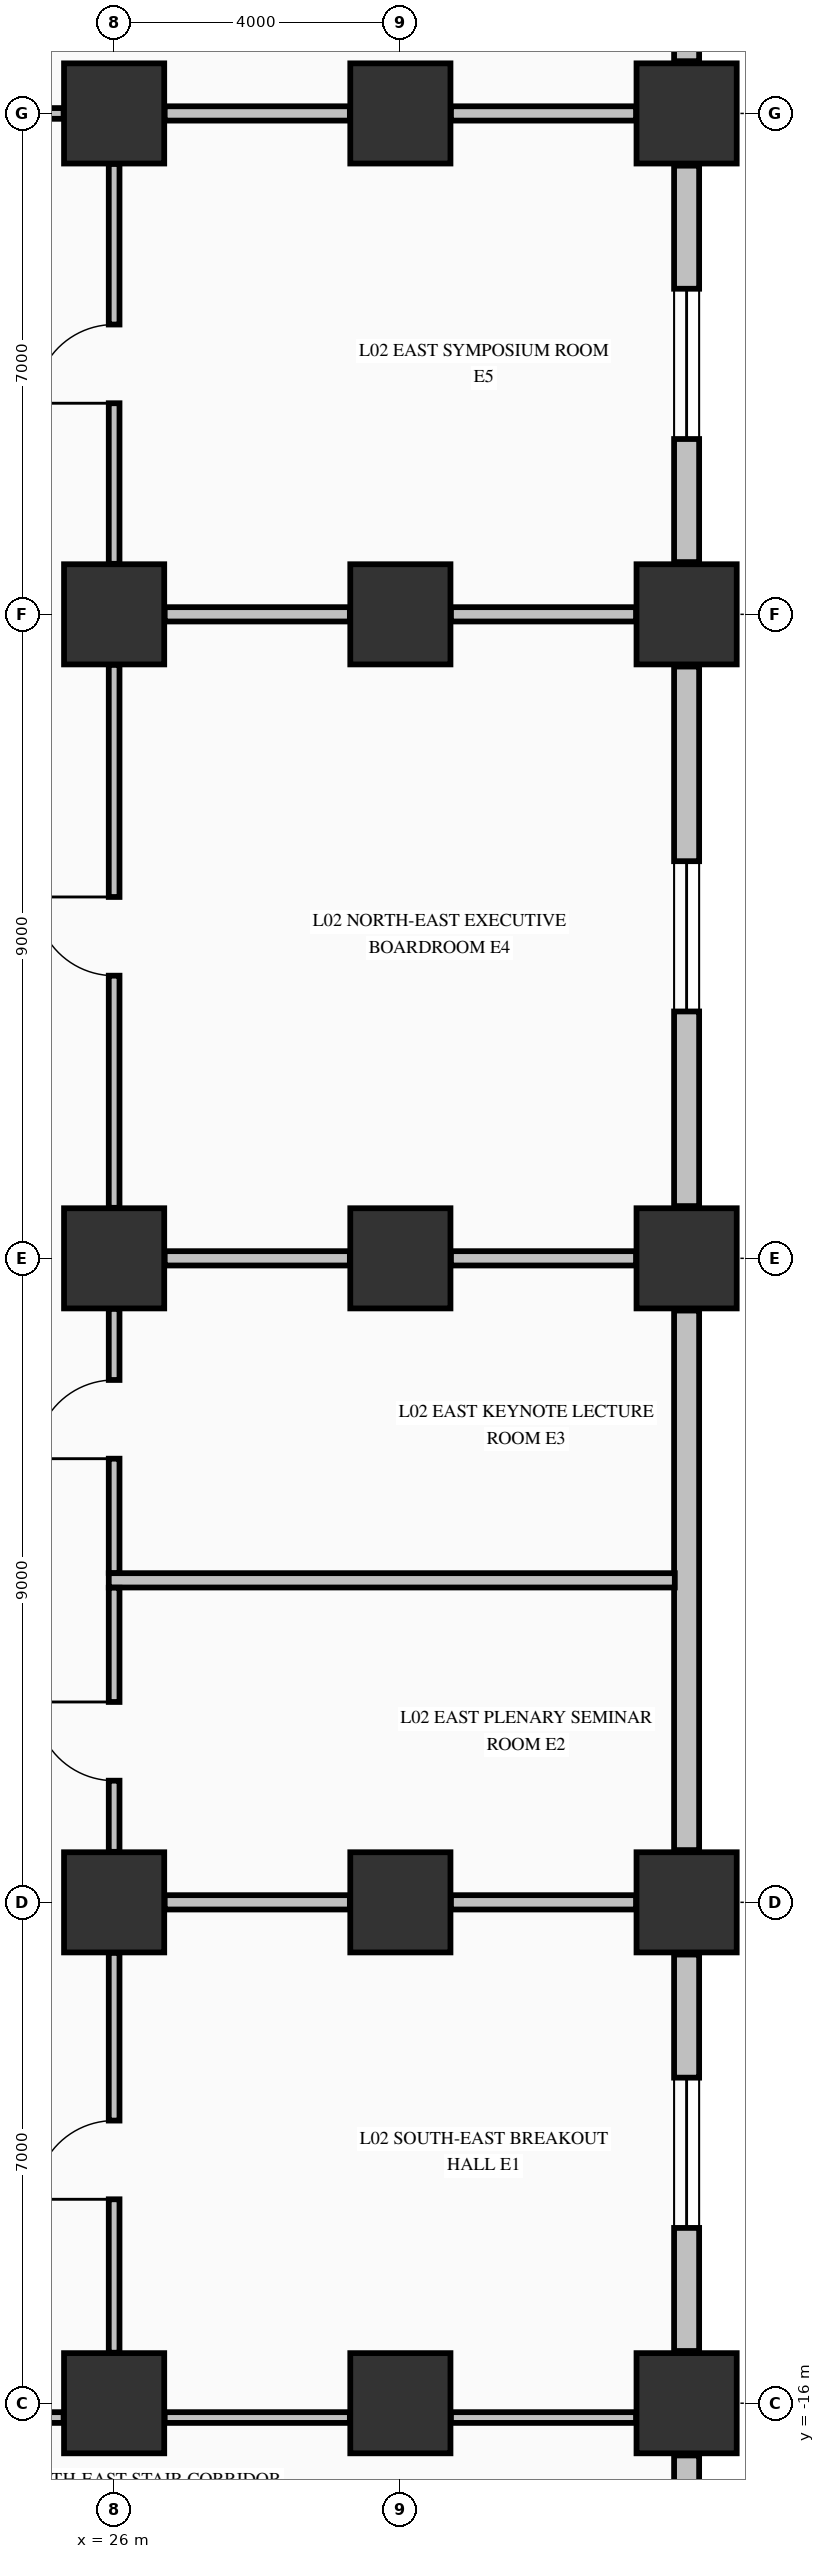
"""IFC4 building model, lengths in metres.
Left out: names, types, materials, properties, quantities, classifications, styles, units other than length and angle.
Written with IfcOpenShell. Run it as: python <this file> out.ifc"""

import sys

from ifc_helpers import new_model, si_unit, direction, frame, frame_2d, origin, origin_2d, place, context, subcontext, project, spatial, rectangle, extrude, element, fill, save


model = new_model("IFC4")
c1 = context("Model", 3, precision=1e-05, world=origin(), true_north=direction((0.0, 1.0)))
c2 = subcontext(c1, "Body", "Model", "MODEL_VIEW")
j1 = project(units=[si_unit("LENGTHUNIT", "METRE"), si_unit("PLANEANGLEUNIT", "RADIAN")], contexts=[c1])
p1 = place(None, origin())
s1 = spatial("IfcSite", under=j1, at=p1, CompositionType="ELEMENT")
p2 = place(p1, origin())
s2 = spatial("IfcBuilding", under=s1, at=p2, CompositionType="ELEMENT")
p3 = place(p2, frame((0.0, 0.0, 10.88)))
s3 = spatial("IfcBuildingStorey", under=s2, at=p3, CompositionType="ELEMENT", Elevation=10.88)
for number, where, z_axis, x_axis in (
    (1, (26.0, -16.0, 0.0), (0.0, 0.0, 1.0), (1.0, 0.0, 0.0)),
    (2, (26.0, -9.0, 0.0), (0.0, 0.0, 1.0), (1.0, 0.0, 0.0)),
    (3, (26.0, 0.0, 0.0), (0.0, 0.0, 1.0), (1.0, 0.0, 0.0)),
    (4, (26.0, 9.0, 0.0), (0.0, 0.0, 1.0), (1.0, 0.0, 0.0)),
    (5, (26.0, 16.0, 0.0), (0.0, 0.0, 1.0), (1.0, 0.0, 0.0)),
    (6, (30.0, -16.0, 0.0), (0.0, 0.0, 1.0), (1.0, 0.0, 0.0)),
    (7, (30.0, -9.0, 0.0), (0.0, 0.0, 1.0), (1.0, 0.0, 0.0)),
    (8, (30.0, 0.0, 0.0), (0.0, 0.0, 1.0), (1.0, 0.0, 0.0)),
    (9, (30.0, 9.0, 0.0), (0.0, 0.0, 1.0), (1.0, 0.0, 0.0)),
    (10, (30.0, 16.0, 0.0), (0.0, 0.0, 1.0), (1.0, 0.0, 0.0)),
    (11, (34.0, -16.0, 0.0), (0.0, 0.0, 1.0), (1.0, 0.0, 0.0)),
    (12, (34.0, -9.0, 0.0), (0.0, 0.0, 1.0), (1.0, 0.0, 0.0)),
    (13, (34.0, 0.0, 0.0), (0.0, 0.0, 1.0), (1.0, 0.0, 0.0)),
    (14, (34.0, 9.0, 0.0), (0.0, 0.0, 1.0), (1.0, 0.0, 0.0)),
    (15, (34.0, 16.0, 0.0), (0.0, 0.0, 1.0), (1.0, 0.0, 0.0)),
):
    element("IfcColumn", number, at=place(p3, frame(where, z_axis=z_axis, x_axis=x_axis)), inside=s3, PredefinedType="COLUMN", context=c2, shape_type="SweptSolid", body=[
        extrude(rectangle(XDim=1.4, YDim=1.4, at=origin_2d()), origin(), (0.0, 0.0, 1.0), 5.09),
    ])
p4 = place(p3, frame((34.0, -16.73, 0.0), z_axis=(0.0, 0.0, 1.0), x_axis=(0.0, -1.0, 0.0)))
e16 = element("IfcWall", 16, at=p4, inside=s3, PredefinedType="STANDARD", context=c2, shape_type="SweptSolid", body=[
    extrude(rectangle(XDim=4.54, YDim=0.35, at=frame_2d((2.27, 0.0))), origin(), (0.0, 0.0, 1.0), 5.09),
])
p5 = place(p3, frame((34.0, -9.73, 0.0), z_axis=(0.0, 0.0, 1.0), x_axis=(0.0, -1.0, 0.0)))
e17 = element("IfcWall", 17, at=p5, inside=s3, PredefinedType="STANDARD", context=c2, shape_type="SweptSolid", body=[
    extrude(rectangle(XDim=5.54, YDim=0.35, at=frame_2d((2.77, 0.0))), origin(), (0.0, 0.0, 1.0), 4.482),
])
p6 = place(p5, frame((1.72, 0.0, 0.75)))
e18 = element("IfcOpeningElement", 18, at=p6, cuts=e17, PredefinedType="OPENING", context=c2, shape_type="SweptSolid", body=[
    extrude(rectangle(XDim=2.1, YDim=1.75, at=frame_2d((1.05, 0.875))), frame((0.0, 0.185, 0.0), z_axis=(0.0, -1.0, 0.0), x_axis=(1.0, 0.0, 0.0)), (0.0, 0.0, 1.0), 0.37),
])
p7 = place(p3, frame((34.0, -0.73, 0.0), z_axis=(0.0, 0.0, 1.0), x_axis=(0.0, -1.0, 0.0)))
e19 = element("IfcWall", 19, at=p7, inside=s3, PredefinedType="STANDARD", context=c2, shape_type="SweptSolid", body=[
    extrude(rectangle(XDim=7.54, YDim=0.35, at=frame_2d((3.77, 0.0))), origin(), (0.0, 0.0, 1.0), 4.482),
])
p8 = place(p3, frame((34.0, 8.27, 0.0), z_axis=(0.0, 0.0, 1.0), x_axis=(0.0, -1.0, 0.0)))
e20 = element("IfcWall", 20, at=p8, inside=s3, PredefinedType="STANDARD", context=c2, shape_type="SweptSolid", body=[
    extrude(rectangle(XDim=7.54, YDim=0.35, at=frame_2d((3.77, 0.0))), origin(), (0.0, 0.0, 1.0), 4.482),
])
p9 = place(p8, frame((2.72, 0.0, 0.75)))
e21 = element("IfcOpeningElement", 21, at=p9, cuts=e20, PredefinedType="OPENING", context=c2, shape_type="SweptSolid", body=[
    extrude(rectangle(XDim=2.1, YDim=1.75, at=frame_2d((1.05, 0.875))), frame((0.0, 0.185, 0.0), z_axis=(0.0, -1.0, 0.0), x_axis=(1.0, 0.0, 0.0)), (0.0, 0.0, 1.0), 0.37),
])
p10 = place(p3, frame((34.0, 15.27, 0.0), z_axis=(0.0, 0.0, 1.0), x_axis=(0.0, -1.0, 0.0)))
e22 = element("IfcWall", 22, at=p10, inside=s3, PredefinedType="STANDARD", context=c2, shape_type="SweptSolid", body=[
    extrude(rectangle(XDim=5.54, YDim=0.35, at=frame_2d((2.77, 0.0))), origin(), (0.0, 0.0, 1.0), 4.482),
])
p11 = place(p10, frame((1.72, 0.0, 0.75)))
e23 = element("IfcOpeningElement", 23, at=p11, cuts=e22, PredefinedType="OPENING", context=c2, shape_type="SweptSolid", body=[
    extrude(rectangle(XDim=2.1, YDim=1.75, at=frame_2d((1.05, 0.875))), frame((0.0, 0.185, 0.0), z_axis=(0.0, -1.0, 0.0), x_axis=(1.0, 0.0, 0.0)), (0.0, 0.0, 1.0), 0.37),
])
p12 = place(p3, frame((34.0, 21.27, 0.0), z_axis=(0.0, 0.0, 1.0), x_axis=(0.0, -1.0, 0.0)))
e24 = element("IfcWall", 24, at=p12, inside=s3, PredefinedType="STANDARD", context=c2, shape_type="SweptSolid", body=[
    extrude(rectangle(XDim=4.54, YDim=0.35, at=frame_2d((2.27, 0.0))), origin(), (0.0, 0.0, 1.0), 5.09),
])
p13 = place(p3, frame((20.806, -16.2, 0.0), z_axis=(0.0, 0.0, 1.0), x_axis=(1.0, 0.0, 0.0)))
e25 = element("IfcWall", 25, at=p13, inside=s3, PredefinedType="PARTITIONING", context=c2, shape_type="SweptSolid", body=[
    extrude(rectangle(XDim=4.488, YDim=0.15, at=frame_2d((2.244, 0.0))), origin(), (0.0, 0.0, 1.0), 4.132),
])
p14 = place(p13, frame((0.15, 0.0, 0.0)))
e26 = element("IfcOpeningElement", 26, at=p14, cuts=e25, PredefinedType="OPENING", context=c2, shape_type="SweptSolid", body=[
    extrude(rectangle(XDim=1.1, YDim=2.15, at=frame_2d((0.55, 1.075))), frame((0.0, 0.085, 0.0), z_axis=(0.0, -1.0, 0.0), x_axis=(1.0, 0.0, 0.0)), (0.0, 0.0, 1.0), 0.17),
])
p15 = place(p13, frame((2.844, 0.0, 0.0)))
e27 = element("IfcOpeningElement", 27, at=p15, cuts=e25, PredefinedType="OPENING", context=c2, shape_type="SweptSolid", body=[
    extrude(rectangle(XDim=1.1, YDim=2.15, at=frame_2d((0.55, 1.075))), frame((0.0, 0.085, 0.0), z_axis=(0.0, -1.0, 0.0), x_axis=(1.0, 0.0, 0.0)), (0.0, 0.0, 1.0), 0.17),
])
for number, where, z_axis, x_axis in (
    (28, (26.706, -16.2, 0.0), (0.0, 0.0, 1.0), (1.0, 0.0, 0.0)),
    (29, (30.706, -16.2, 0.0), (0.0, 0.0, 1.0), (1.0, 0.0, 0.0)),
):
    element("IfcWall", number, at=place(p3, frame(where, z_axis=z_axis, x_axis=x_axis)), inside=s3, PredefinedType="PARTITIONING", context=c2, shape_type="SweptSolid", body=[
        extrude(rectangle(XDim=2.588, YDim=0.15, at=frame_2d((1.294, 0.0))), origin(), (0.0, 0.0, 1.0), 4.132),
    ])
for number, where, z_axis, x_axis in (
    (30, (26.706, -9.0, 0.0), (0.0, 0.0, 1.0), (1.0, 0.0, 0.0)),
    (31, (30.706, -9.0, 0.0), (0.0, 0.0, 1.0), (1.0, 0.0, 0.0)),
):
    element("IfcWall", number, at=place(p3, frame(where, z_axis=z_axis, x_axis=x_axis)), inside=s3, PredefinedType="PARTITIONING", context=c2, shape_type="SweptSolid", body=[
        extrude(rectangle(XDim=2.588, YDim=0.2, at=frame_2d((1.294, 0.0))), origin(), (0.0, 0.0, 1.0), 4.132),
    ])
p16 = place(p3, frame((25.925, -4.5, 0.0), z_axis=(0.0, 0.0, 1.0), x_axis=(1.0, 0.0, 0.0)))
e32 = element("IfcWall", 32, at=p16, inside=s3, PredefinedType="PARTITIONING", context=c2, shape_type="SweptSolid", body=[
    extrude(rectangle(XDim=7.91, YDim=0.2, at=frame_2d((3.955, 0.0))), origin(), (0.0, 0.0, 1.0), 4.48),
])
for number, where, z_axis, x_axis in (
    (33, (26.706, 0.0, 0.0), (0.0, 0.0, 1.0), (1.0, 0.0, 0.0)),
    (34, (30.706, 0.0, 0.0), (0.0, 0.0, 1.0), (1.0, 0.0, 0.0)),
    (35, (26.706, 9.0, 0.0), (0.0, 0.0, 1.0), (1.0, 0.0, 0.0)),
    (36, (30.706, 9.0, 0.0), (0.0, 0.0, 1.0), (1.0, 0.0, 0.0)),
):
    element("IfcWall", number, at=place(p3, frame(where, z_axis=z_axis, x_axis=x_axis)), inside=s3, PredefinedType="PARTITIONING", context=c2, shape_type="SweptSolid", body=[
        extrude(rectangle(XDim=2.588, YDim=0.2, at=frame_2d((1.294, 0.0))), origin(), (0.0, 0.0, 1.0), 4.132),
    ])
p17 = place(p3, frame((20.806, 16.0, 0.0), z_axis=(0.0, 0.0, 1.0), x_axis=(1.0, 0.0, 0.0)))
e37 = element("IfcWall", 37, at=p17, inside=s3, PredefinedType="PARTITIONING", context=c2, shape_type="SweptSolid", body=[
    extrude(rectangle(XDim=4.488, YDim=0.15, at=frame_2d((2.244, 0.0))), origin(), (0.0, 0.0, 1.0), 4.132),
])
p18 = place(p17, frame((0.15, 0.0, 0.0)))
e38 = element("IfcOpeningElement", 38, at=p18, cuts=e37, PredefinedType="OPENING", context=c2, shape_type="SweptSolid", body=[
    extrude(rectangle(XDim=1.1, YDim=2.15, at=frame_2d((0.55, 1.075))), frame((0.0, 0.085, 0.0), z_axis=(0.0, -1.0, 0.0), x_axis=(1.0, 0.0, 0.0)), (0.0, 0.0, 1.0), 0.17),
])
p19 = place(p17, frame((2.844, 0.0, 0.0)))
e39 = element("IfcOpeningElement", 39, at=p19, cuts=e37, PredefinedType="OPENING", context=c2, shape_type="SweptSolid", body=[
    extrude(rectangle(XDim=1.1, YDim=2.15, at=frame_2d((0.55, 1.075))), frame((0.0, 0.085, 0.0), z_axis=(0.0, -1.0, 0.0), x_axis=(1.0, 0.0, 0.0)), (0.0, 0.0, 1.0), 0.17),
])
for number, where, z_axis, x_axis in (
    (40, (26.706, 16.0, 0.0), (0.0, 0.0, 1.0), (1.0, 0.0, 0.0)),
    (41, (30.706, 16.0, 0.0), (0.0, 0.0, 1.0), (1.0, 0.0, 0.0)),
):
    element("IfcWall", number, at=place(p3, frame(where, z_axis=z_axis, x_axis=x_axis)), inside=s3, PredefinedType="PARTITIONING", context=c2, shape_type="SweptSolid", body=[
        extrude(rectangle(XDim=2.588, YDim=0.2, at=frame_2d((1.294, 0.0))), origin(), (0.0, 0.0, 1.0), 4.132),
    ])
p20 = place(p3, frame((26.0, -15.294, 0.0), z_axis=(0.0, 0.0, 1.0), x_axis=(0.0, 1.0, 0.0)))
e42 = element("IfcWall", 42, at=p20, inside=s3, PredefinedType="PARTITIONING", context=c2, shape_type="SweptSolid", body=[
    extrude(rectangle(XDim=5.588, YDim=0.15, at=frame_2d((2.794, 0.0))), origin(), (0.0, 0.0, 1.0), 4.132),
])
p21 = place(p20, frame((2.144, 0.0, 0.0)))
e43 = element("IfcOpeningElement", 43, at=p21, cuts=e42, PredefinedType="OPENING", context=c2, shape_type="SweptSolid", body=[
    extrude(rectangle(XDim=1.1, YDim=2.15, at=frame_2d((0.55, 1.075))), frame((0.0, 0.085, 0.0), z_axis=(0.0, -1.0, 0.0), x_axis=(1.0, 0.0, 0.0)), (0.0, 0.0, 1.0), 0.17),
])
p22 = place(p3, frame((26.0, -8.294, 0.0), z_axis=(0.0, 0.0, 1.0), x_axis=(0.0, 1.0, 0.0)))
e44 = element("IfcWall", 44, at=p22, inside=s3, PredefinedType="PARTITIONING", context=c2, shape_type="SweptSolid", body=[
    extrude(rectangle(XDim=3.691, YDim=0.15, at=frame_2d((1.845, 0.0))), origin(), (0.0, 0.0, 1.0), 4.132),
])
p23 = place(p22, frame((0.994, 0.0, 0.0)))
e45 = element("IfcOpeningElement", 45, at=p23, cuts=e44, PredefinedType="OPENING", context=c2, shape_type="SweptSolid", body=[
    extrude(rectangle(XDim=1.1, YDim=2.15, at=frame_2d((0.55, 1.075))), frame((0.0, 0.085, 0.0), z_axis=(0.0, -1.0, 0.0), x_axis=(1.0, 0.0, 0.0)), (0.0, 0.0, 1.0), 0.17),
])
p24 = place(p3, frame((26.0, -4.397, 0.0), z_axis=(0.0, 0.0, 1.0), x_axis=(0.0, 1.0, 0.0)))
e46 = element("IfcWall", 46, at=p24, inside=s3, PredefinedType="PARTITIONING", context=c2, shape_type="SweptSolid", body=[
    extrude(rectangle(XDim=3.691, YDim=0.15, at=frame_2d((1.845, 0.0))), origin(), (0.0, 0.0, 1.0), 4.132),
])
p25 = place(p24, frame((1.597, 0.0, 0.0)))
e47 = element("IfcOpeningElement", 47, at=p25, cuts=e46, PredefinedType="OPENING", context=c2, shape_type="SweptSolid", body=[
    extrude(rectangle(XDim=1.1, YDim=2.15, at=frame_2d((0.55, 1.075))), frame((0.0, 0.085, 0.0), z_axis=(0.0, -1.0, 0.0), x_axis=(1.0, 0.0, 0.0)), (0.0, 0.0, 1.0), 0.17),
])
p26 = place(p3, frame((26.0, 0.706, 0.0), z_axis=(0.0, 0.0, 1.0), x_axis=(0.0, 1.0, 0.0)))
e48 = element("IfcWall", 48, at=p26, inside=s3, PredefinedType="PARTITIONING", context=c2, shape_type="SweptSolid", body=[
    extrude(rectangle(XDim=7.588, YDim=0.15, at=frame_2d((3.794, 0.0))), origin(), (0.0, 0.0, 1.0), 4.132),
])
p27 = place(p26, frame((3.244, 0.0, 0.0)))
e49 = element("IfcOpeningElement", 49, at=p27, cuts=e48, PredefinedType="OPENING", context=c2, shape_type="SweptSolid", body=[
    extrude(rectangle(XDim=1.1, YDim=2.15, at=frame_2d((0.55, 1.075))), frame((0.0, 0.085, 0.0), z_axis=(0.0, -1.0, 0.0), x_axis=(1.0, 0.0, 0.0)), (0.0, 0.0, 1.0), 0.17),
])
p28 = place(p3, frame((26.0, 9.706, 0.0), z_axis=(0.0, 0.0, 1.0), x_axis=(0.0, 1.0, 0.0)))
e50 = element("IfcWall", 50, at=p28, inside=s3, PredefinedType="PARTITIONING", context=c2, shape_type="SweptSolid", body=[
    extrude(rectangle(XDim=5.588, YDim=0.15, at=frame_2d((2.794, 0.0))), origin(), (0.0, 0.0, 1.0), 4.132),
])
p29 = place(p28, frame((2.244, 0.0, 0.0)))
e51 = element("IfcOpeningElement", 51, at=p29, cuts=e50, PredefinedType="OPENING", context=c2, shape_type="SweptSolid", body=[
    extrude(rectangle(XDim=1.1, YDim=2.15, at=frame_2d((0.55, 1.075))), frame((0.0, 0.085, 0.0), z_axis=(0.0, -1.0, 0.0), x_axis=(1.0, 0.0, 0.0)), (0.0, 0.0, 1.0), 0.17),
])
p30 = place(p6, origin())
e52 = element("IfcWindow", 52, at=p30, inside=s3, PartitioningType="SINGLE_PANEL", PredefinedType="WINDOW", context=c2, shape_type="SweptSolid", body=[
    extrude(rectangle(XDim=2.1, YDim=1.75, at=frame_2d((1.05, 0.875))), frame((0.0, 0.03, 0.0), z_axis=(0.0, -1.0, 0.0), x_axis=(1.0, 0.0, 0.0)), (0.0, 0.0, 1.0), 0.06),
])
fill(e18, e52)
p31 = place(p9, origin())
e53 = element("IfcWindow", 53, at=p31, inside=s3, PartitioningType="SINGLE_PANEL", PredefinedType="WINDOW", context=c2, shape_type="SweptSolid", body=[
    extrude(rectangle(XDim=2.1, YDim=1.75, at=frame_2d((1.05, 0.875))), frame((0.0, 0.03, 0.0), z_axis=(0.0, -1.0, 0.0), x_axis=(1.0, 0.0, 0.0)), (0.0, 0.0, 1.0), 0.06),
])
fill(e21, e53)
p32 = place(p11, origin())
e54 = element("IfcWindow", 54, at=p32, inside=s3, PartitioningType="SINGLE_PANEL", PredefinedType="WINDOW", context=c2, shape_type="SweptSolid", body=[
    extrude(rectangle(XDim=2.1, YDim=1.75, at=frame_2d((1.05, 0.875))), frame((0.0, 0.03, 0.0), z_axis=(0.0, -1.0, 0.0), x_axis=(1.0, 0.0, 0.0)), (0.0, 0.0, 1.0), 0.06),
])
fill(e23, e54)
p33 = place(p21, origin())
e55 = element("IfcDoor", 55, at=p33, inside=s3, OperationType="SINGLE_SWING_LEFT", PredefinedType="DOOR", context=c2, shape_type="SweptSolid", body=[
    extrude(rectangle(XDim=1.1, YDim=2.15, at=frame_2d((0.55, 1.075))), frame((0.0, 0.025, 0.0), z_axis=(0.0, -1.0, 0.0), x_axis=(1.0, 0.0, 0.0)), (0.0, 0.0, 1.0), 0.05),
])
fill(e43, e55)
p34 = place(p23, origin())
e56 = element("IfcDoor", 56, at=p34, inside=s3, OperationType="SINGLE_SWING_RIGHT", PredefinedType="DOOR", context=c2, shape_type="SweptSolid", body=[
    extrude(rectangle(XDim=1.1, YDim=2.15, at=frame_2d((0.55, 1.075))), frame((0.0, 0.025, 0.0), z_axis=(0.0, -1.0, 0.0), x_axis=(1.0, 0.0, 0.0)), (0.0, 0.0, 1.0), 0.05),
])
fill(e45, e56)
p35 = place(p25, origin())
e57 = element("IfcDoor", 57, at=p35, inside=s3, OperationType="SINGLE_SWING_LEFT", PredefinedType="DOOR", context=c2, shape_type="SweptSolid", body=[
    extrude(rectangle(XDim=1.1, YDim=2.15, at=frame_2d((0.55, 1.075))), frame((0.0, 0.025, 0.0), z_axis=(0.0, -1.0, 0.0), x_axis=(1.0, 0.0, 0.0)), (0.0, 0.0, 1.0), 0.05),
])
fill(e47, e57)
p36 = place(p27, origin())
e58 = element("IfcDoor", 58, at=p36, inside=s3, OperationType="SINGLE_SWING_RIGHT", PredefinedType="DOOR", context=c2, shape_type="SweptSolid", body=[
    extrude(rectangle(XDim=1.1, YDim=2.15, at=frame_2d((0.55, 1.075))), frame((0.0, 0.025, 0.0), z_axis=(0.0, -1.0, 0.0), x_axis=(1.0, 0.0, 0.0)), (0.0, 0.0, 1.0), 0.05),
])
fill(e49, e58)
p37 = place(p29, origin())
e59 = element("IfcDoor", 59, at=p37, inside=s3, OperationType="SINGLE_SWING_LEFT", PredefinedType="DOOR", context=c2, shape_type="SweptSolid", body=[
    extrude(rectangle(XDim=1.1, YDim=2.15, at=frame_2d((0.55, 1.075))), frame((0.0, 0.025, 0.0), z_axis=(0.0, -1.0, 0.0), x_axis=(1.0, 0.0, 0.0)), (0.0, 0.0, 1.0), 0.05),
])
fill(e51, e59)
save(model, sys.argv[1])
